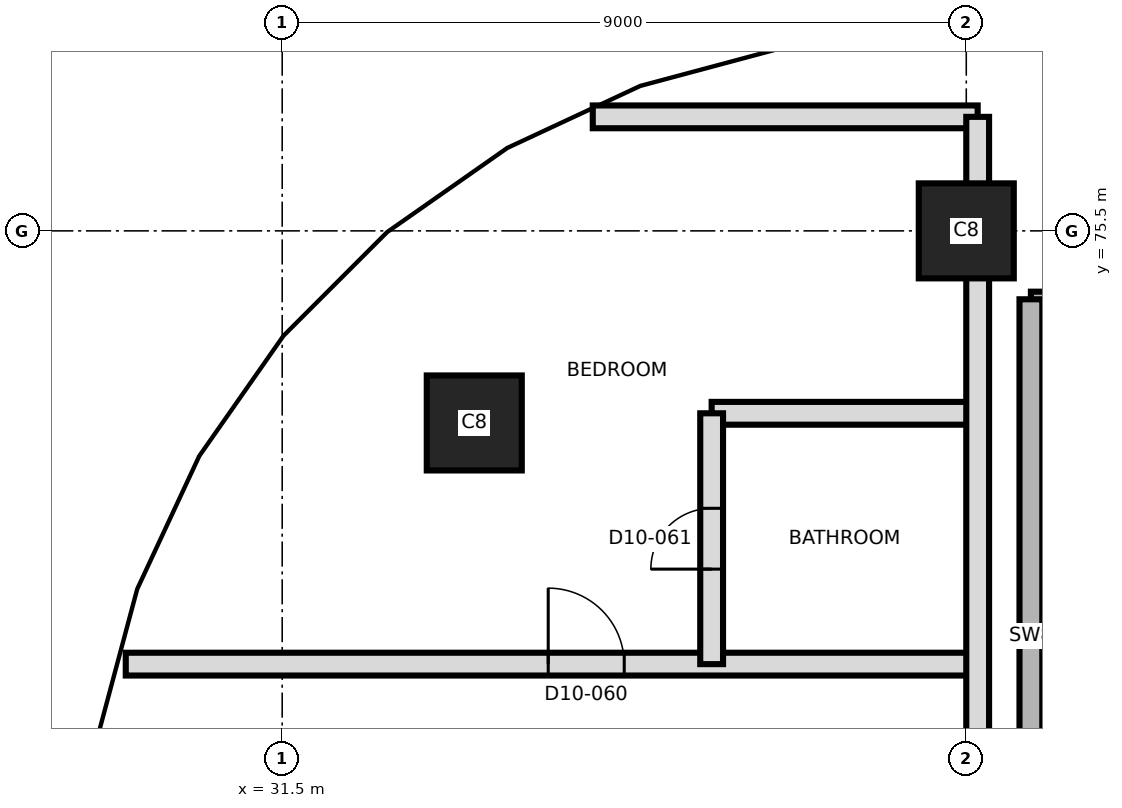
"""IFC4 building model, lengths in metres.
Left out: names, types, materials, properties, quantities, classifications, styles, units other than length and angle.
Written with IfcOpenShell. Run it as: python <this file> out.ifc"""

import sys

from ifc_helpers import new_model, si_unit, direction, frame, frame_2d, origin, origin_2d, place, context, subcontext, project, spatial, rectangle, extrude, element, fill, save


model = new_model("IFC4")
c1 = context("Model", 3, precision=1e-05, world=origin(), true_north=direction((0.0, 1.0)))
c2 = subcontext(c1, "Body", "Model", "MODEL_VIEW")
j1 = project(units=[si_unit("LENGTHUNIT", "METRE"), si_unit("PLANEANGLEUNIT", "RADIAN")], contexts=[c1])
p1 = place(None, origin())
s1 = spatial("IfcSite", under=j1, at=p1, CompositionType="ELEMENT")
p2 = place(p1, origin())
s2 = spatial("IfcBuilding", under=s1, at=p2, CompositionType="ELEMENT")
p3 = place(p2, frame((0.0, 0.0, 120.4)))
s3 = spatial("IfcBuildingStorey", under=s2, at=p3, CompositionType="ELEMENT", Elevation=120.4)
for number, where, z_axis, x_axis in (
    (1, (34.027, 72.973, 0.0), (0.0, 0.0, 1.0), (1.0, 0.0, 0.0)),
    (2, (40.5, 75.5, 0.0), (0.0, 0.0, 1.0), (1.0, 0.0, 0.0)),
):
    element("IfcColumn", number, at=place(p3, frame(where, z_axis=z_axis, x_axis=x_axis)), inside=s3, PredefinedType="COLUMN", context=c2, shape_type="SweptSolid", body=[
        extrude(rectangle(XDim=1.25, YDim=1.25, at=origin_2d()), origin(), (0.0, 0.0, 1.0), 3.7),
    ])
p4 = place(p3, frame((29.442, 69.8, 0.0), z_axis=(0.0, 0.0, 1.0), x_axis=(1.0, 0.0, 0.0)))
e3 = element("IfcWall", 3, at=p4, inside=s3, PredefinedType="PARTITIONING", context=c2, shape_type="SweptSolid", body=[
    extrude(rectangle(XDim=11.208, YDim=0.3, at=frame_2d((5.604, 0.0))), origin(), (0.0, 0.0, 1.0), 3.35),
])
p5 = place(p4, frame((5.558, 0.0, 0.0)))
e4 = element("IfcOpeningElement", 4, at=p5, cuts=e3, PredefinedType="OPENING", context=c2, shape_type="SweptSolid", body=[
    extrude(rectangle(XDim=1.0, YDim=2.1, at=frame_2d((0.5, 1.05))), frame((0.0, 0.16, 0.0), z_axis=(0.0, -1.0, 0.0), x_axis=(1.0, 0.0, 0.0)), (0.0, 0.0, 1.0), 0.32),
])
p6 = place(p3, frame((37.15, 73.1, 0.0), z_axis=(0.0, 0.0, 1.0), x_axis=(1.0, 0.0, 0.0)))
e5 = element("IfcWall", 5, at=p6, inside=s3, PredefinedType="PARTITIONING", context=c2, shape_type="SweptSolid", body=[
    extrude(rectangle(XDim=3.5, YDim=0.3, at=frame_2d((1.75, 0.0))), origin(), (0.0, 0.0, 1.0), 3.4),
])
p7 = place(p3, frame((41.35, 74.55, 0.0), z_axis=(0.0, 0.0, 1.0), x_axis=(1.0, 0.0, 0.0)))
e6 = element("IfcWall", 6, at=p7, inside=s3, PredefinedType="SHEAR", context=c2, shape_type="SweptSolid", body=[
    extrude(rectangle(XDim=3.0, YDim=0.3, at=frame_2d((1.5, 0.0))), origin(), (0.0, 0.0, 1.0), 3.4),
])
p8 = place(p3, frame((35.586, 77.0, 0.0), z_axis=(0.0, 0.0, 1.0), x_axis=(1.0, 0.0, 0.0)))
e7 = element("IfcWall", 7, at=p8, inside=s3, PredefinedType="PARTITIONING", context=c2, shape_type="SweptSolid", body=[
    extrude(rectangle(XDim=5.064, YDim=0.3, at=frame_2d((2.532, 0.0))), origin(), (0.0, 0.0, 1.0), 3.35),
])
p9 = place(p3, frame((37.15, 69.8, 0.0), z_axis=(0.0, 0.0, 1.0), x_axis=(0.0, 1.0, 0.0)))
e8 = element("IfcWall", 8, at=p9, inside=s3, PredefinedType="PARTITIONING", context=c2, shape_type="SweptSolid", body=[
    extrude(rectangle(XDim=3.3, YDim=0.3, at=frame_2d((1.65, 0.0))), origin(), (0.0, 0.0, 1.0), 3.4),
])
p10 = place(p9, frame((1.25, 0.0, 0.0)))
e9 = element("IfcOpeningElement", 9, at=p10, cuts=e8, PredefinedType="OPENING", context=c2, shape_type="SweptSolid", body=[
    extrude(rectangle(XDim=0.8, YDim=2.1, at=frame_2d((0.4, 1.05))), frame((0.0, 0.16, 0.0), z_axis=(0.0, -1.0, 0.0), x_axis=(1.0, 0.0, 0.0)), (0.0, 0.0, 1.0), 0.32),
])
p11 = place(p3, frame((40.65, 39.8, 0.0), z_axis=(0.0, 0.0, 1.0), x_axis=(0.0, 1.0, 0.0)))
e10 = element("IfcWall", 10, at=p11, inside=s3, PredefinedType="PARTITIONING", context=c2, shape_type="SweptSolid", body=[
    extrude(rectangle(XDim=37.2, YDim=0.3, at=frame_2d((18.6, 0.0))), origin(), (0.0, 0.0, 1.0), 3.35),
])
p12 = place(p11, frame((0.835, 0.0, 0.0)))
e11 = element("IfcOpeningElement", 11, at=p12, cuts=e10, PredefinedType="OPENING", context=c2, shape_type="SweptSolid", body=[
    extrude(rectangle(XDim=1.2, YDim=2.1, at=frame_2d((0.6, 1.05))), frame((0.0, 0.16, 0.0), z_axis=(0.0, -1.0, 0.0), x_axis=(1.0, 0.0, 0.0)), (0.0, 0.0, 1.0), 0.32),
])
p13 = place(p11, frame((4.085, 0.0, 0.0)))
e12 = element("IfcOpeningElement", 12, at=p13, cuts=e10, PredefinedType="OPENING", context=c2, shape_type="SweptSolid", body=[
    extrude(rectangle(XDim=1.0, YDim=2.1, at=frame_2d((0.5, 1.05))), frame((0.0, 0.16, 0.0), z_axis=(0.0, -1.0, 0.0), x_axis=(1.0, 0.0, 0.0)), (0.0, 0.0, 1.0), 0.32),
])
p14 = place(p11, frame((9.835, 0.0, 0.0)))
e13 = element("IfcOpeningElement", 13, at=p14, cuts=e10, PredefinedType="OPENING", context=c2, shape_type="SweptSolid", body=[
    extrude(rectangle(XDim=1.2, YDim=2.1, at=frame_2d((0.6, 1.05))), frame((0.0, 0.16, 0.0), z_axis=(0.0, -1.0, 0.0), x_axis=(1.0, 0.0, 0.0)), (0.0, 0.0, 1.0), 0.32),
])
p15 = place(p11, frame((13.085, 0.0, 0.0)))
e14 = element("IfcOpeningElement", 14, at=p15, cuts=e10, PredefinedType="OPENING", context=c2, shape_type="SweptSolid", body=[
    extrude(rectangle(XDim=1.0, YDim=2.1, at=frame_2d((0.5, 1.05))), frame((0.0, 0.16, 0.0), z_axis=(0.0, -1.0, 0.0), x_axis=(1.0, 0.0, 0.0)), (0.0, 0.0, 1.0), 0.32),
])
p16 = place(p11, frame((21.2, 0.0, 0.0)))
e15 = element("IfcOpeningElement", 15, at=p16, cuts=e10, PredefinedType="OPENING", context=c2, shape_type="SweptSolid", body=[
    extrude(rectangle(XDim=1.0, YDim=2.4, at=frame_2d((0.5, 1.2))), frame((0.0, 0.16, 0.0), z_axis=(0.0, -1.0, 0.0), x_axis=(1.0, 0.0, 0.0)), (0.0, 0.0, 1.0), 0.32),
])
p17 = place(p3, frame((41.35, 65.75, 0.0), z_axis=(0.0, 0.0, 1.0), x_axis=(0.0, 1.0, 0.0)))
e16 = element("IfcWall", 16, at=p17, inside=s3, PredefinedType="SHEAR", context=c2, shape_type="SweptSolid", body=[
    extrude(rectangle(XDim=8.85, YDim=0.3, at=frame_2d((4.425, 0.0))), origin(), (0.0, 0.0, 1.0), 3.4),
])
p18 = place(p5, origin())
e17 = element("IfcDoor", 17, at=p18, inside=s3, OperationType="SINGLE_SWING_LEFT", PredefinedType="DOOR", context=c2, shape_type="SweptSolid", body=[
    extrude(rectangle(XDim=1.0, YDim=2.1, at=frame_2d((0.5, 1.05))), frame((0.0, 0.025, 0.0), z_axis=(0.0, -1.0, 0.0), x_axis=(1.0, 0.0, 0.0)), (0.0, 0.0, 1.0), 0.05),
])
fill(e4, e17)
p19 = place(p10, origin())
e18 = element("IfcDoor", 18, at=p19, inside=s3, OperationType="SINGLE_SWING_RIGHT", PredefinedType="DOOR", context=c2, shape_type="SweptSolid", body=[
    extrude(rectangle(XDim=0.8, YDim=2.1, at=frame_2d((0.4, 1.05))), frame((0.0, 0.025, 0.0), z_axis=(0.0, -1.0, 0.0), x_axis=(1.0, 0.0, 0.0)), (0.0, 0.0, 1.0), 0.05),
])
fill(e9, e18)
save(model, sys.argv[1])
